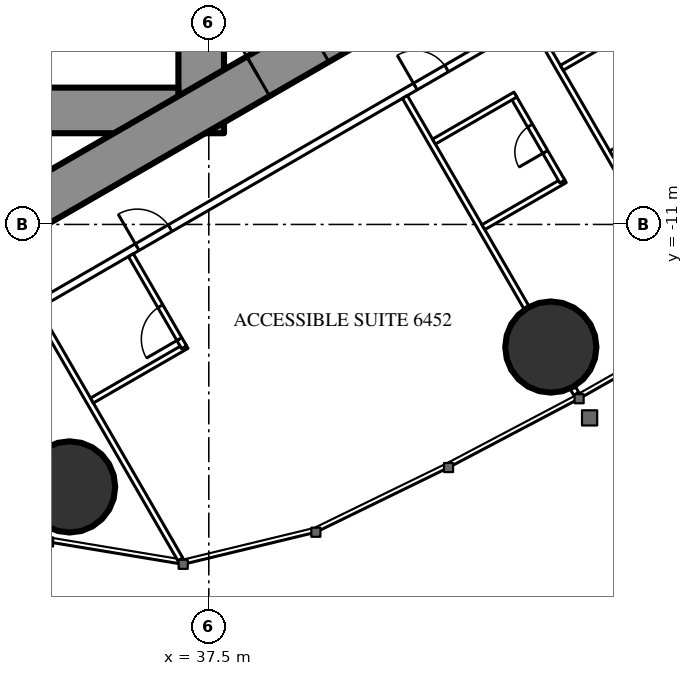
"""IFC4 building model, lengths in metres.
Left out: names, types, materials, properties, quantities, classifications, styles, units other than length and angle.
Written with IfcOpenShell. Run it as: python <this file> out.ifc"""

import sys

from ifc_helpers import new_model, si_unit, direction, frame, frame_2d, origin, origin_2d, place, context, subcontext, project, spatial, rectangle, circle, extrude, element, fill, save


model = new_model("IFC4")
c1 = context("Model", 3, precision=1e-05, world=origin(), true_north=direction((0.0, 1.0)))
c2 = subcontext(c1, "Body", "Model", "MODEL_VIEW")
j1 = project(units=[si_unit("LENGTHUNIT", "METRE"), si_unit("PLANEANGLEUNIT", "RADIAN")], contexts=[c1])
p1 = place(None, origin())
s1 = spatial("IfcSite", under=j1, at=p1, CompositionType="ELEMENT")
p2 = place(p1, origin())
s2 = spatial("IfcBuilding", under=s1, at=p2, CompositionType="ELEMENT")
p3 = place(p2, frame((0.0, 0.0, 240.5)))
s3 = spatial("IfcBuildingStorey", under=s2, at=p3, CompositionType="ELEMENT", Elevation=240.5)
for number, where, z_axis, x_axis in (
    (1, (33.837, -17.906, 0.0), (0.0, 0.0, 1.0), (1.0, 0.0, 0.0)),
    (2, (46.499, -14.226, 0.0), (0.0, 0.0, 1.0), (1.0, 0.0, 0.0)),
):
    element("IfcColumn", number, at=place(p3, frame(where, z_axis=z_axis, x_axis=x_axis)), inside=s3, PredefinedType="COLUMN", context=c2, shape_type="SweptSolid", body=[
        extrude(circle(Radius=1.2, at=origin_2d()), origin(), (0.0, 0.0, 1.0), 3.6),
    ])
p4 = place(p3, frame((37.3, -8.6, 0.0), z_axis=(0.0, 0.0, 1.0), x_axis=(0.0, 1.0, 0.0)))
e3 = element("IfcWall", 3, at=p4, inside=s3, PredefinedType="SHEAR", context=c2, shape_type="SweptSolid", body=[
    extrude(rectangle(XDim=17.2, YDim=1.2, at=frame_2d((8.6, 0.0))), origin(), (0.0, 0.0, 1.0), 3.6),
])
p5 = place(p4, frame((7.7, 0.0, 0.0)))
e4 = element("IfcOpeningElement", 4, at=p5, cuts=e3, PredefinedType="OPENING", context=c2, shape_type="SweptSolid", body=[
    extrude(rectangle(XDim=1.8, YDim=2.2, at=frame_2d((0.9, 1.1))), frame((0.0, 0.61, 0.0), z_axis=(0.0, -1.0, 0.0), x_axis=(1.0, 0.0, 0.0)), (0.0, 0.0, 1.0), 1.22),
])
p6 = place(p3, frame((28.3, -8.0, 0.0), z_axis=(0.0, 0.0, 1.0), x_axis=(1.0, 0.0, 0.0)))
e5 = element("IfcWall", 5, at=p6, inside=s3, PredefinedType="SHEAR", context=c2, shape_type="SweptSolid", body=[
    extrude(rectangle(XDim=8.4, YDim=1.2, at=frame_2d((4.2, 0.0))), origin(), (0.0, 0.0, 1.0), 3.6),
])
p7 = place(p6, frame((0.25, 0.0, 0.0)))
e6 = element("IfcOpeningElement", 6, at=p7, cuts=e5, PredefinedType="OPENING", context=c2, shape_type="SweptSolid", body=[
    extrude(rectangle(XDim=1.0, YDim=2.2, at=frame_2d((0.5, 1.1))), frame((0.0, 0.61, 0.0), z_axis=(0.0, -1.0, 0.0), x_axis=(1.0, 0.0, 0.0)), (0.0, 0.0, 1.0), 1.22),
])
p8 = place(p3, frame((27.2, -13.8, 0.0), z_axis=(0.0, 0.0, 1.0), x_axis=(0.866027159892, 0.499996958321, 0.0)))
e7 = element("IfcWall", 7, at=p8, inside=s3, PredefinedType="SHEAR", context=c2, shape_type="SweptSolid", body=[
    extrude(rectangle(XDim=27.947, YDim=1.2, at=frame_2d((13.973, 0.0))), origin(), (0.0, 0.0, 1.0), 3.6),
])
p9 = place(p8, frame((4.6, 0.0, 0.0)))
e8 = element("IfcOpeningElement", 8, at=p9, cuts=e7, PredefinedType="OPENING", context=c2, shape_type="SweptSolid", body=[
    extrude(rectangle(XDim=1.0, YDim=2.2, at=frame_2d((0.5, 1.1))), frame((0.0, 0.61, 0.0), z_axis=(0.0, -1.0, 0.0), x_axis=(1.0, 0.0, 0.0)), (0.0, 0.0, 1.0), 1.22),
])
p10 = place(p8, frame((13.395, 0.0, 0.0)))
e9 = element("IfcOpeningElement", 9, at=p10, cuts=e7, PredefinedType="OPENING", context=c2, shape_type="SweptSolid", body=[
    extrude(rectangle(XDim=1.8, YDim=2.2, at=frame_2d((0.9, 1.1))), frame((0.0, 0.61, 0.0), z_axis=(0.0, -1.0, 0.0), x_axis=(1.0, 0.0, 0.0)), (0.0, 0.0, 1.0), 1.22),
])
p11 = place(p3, frame((28.959, -15.44, 0.0), z_axis=(0.0, 0.0, 1.0), x_axis=(0.866025227435, 0.500000305447, 0.0)))
e10 = element("IfcWall", 10, at=p11, inside=s3, PredefinedType="PARTITIONING", context=c2, shape_type="SweptSolid", body=[
    extrude(rectangle(XDim=30.88, YDim=0.2, at=frame_2d((15.44, 0.0))), origin(), (0.0, 0.0, 1.0), 3.35),
])
p12 = place(p11, frame((1.494, 0.0, 0.0)))
e11 = element("IfcOpeningElement", 11, at=p12, cuts=e10, PredefinedType="OPENING", context=c2, shape_type="SweptSolid", body=[
    extrude(rectangle(XDim=1.8, YDim=2.03, at=frame_2d((0.9, 1.015))), frame((0.0, 0.11, 0.0), z_axis=(0.0, -1.0, 0.0), x_axis=(1.0, 0.0, 0.0)), (0.0, 0.0, 1.0), 0.22),
])
p13 = place(p11, frame((7.687, 0.0, 0.0)))
e12 = element("IfcOpeningElement", 12, at=p13, cuts=e10, PredefinedType="OPENING", context=c2, shape_type="SweptSolid", body=[
    extrude(rectangle(XDim=1.0, YDim=2.2, at=frame_2d((0.5, 1.1))), frame((0.0, 0.11, 0.0), z_axis=(0.0, -1.0, 0.0), x_axis=(1.0, 0.0, 0.0)), (0.0, 0.0, 1.0), 0.22),
])
p14 = place(p11, frame((16.137, 0.0, 0.0)))
e13 = element("IfcOpeningElement", 13, at=p14, cuts=e10, PredefinedType="OPENING", context=c2, shape_type="SweptSolid", body=[
    extrude(rectangle(XDim=0.95, YDim=2.2, at=frame_2d((0.475, 1.1))), frame((0.0, 0.11, 0.0), z_axis=(0.0, -1.0, 0.0), x_axis=(1.0, 0.0, 0.0)), (0.0, 0.0, 1.0), 0.22),
])
p15 = place(p11, frame((20.021, 0.0, 0.0)))
e14 = element("IfcOpeningElement", 14, at=p15, cuts=e10, PredefinedType="OPENING", context=c2, shape_type="SweptSolid", body=[
    extrude(rectangle(XDim=0.95, YDim=2.2, at=frame_2d((0.475, 1.1))), frame((0.0, 0.11, 0.0), z_axis=(0.0, -1.0, 0.0), x_axis=(1.0, 0.0, 0.0)), (0.0, 0.0, 1.0), 0.22),
])
p16 = place(p11, frame((26.253, 0.0, 0.0)))
e15 = element("IfcOpeningElement", 15, at=p16, cuts=e10, PredefinedType="OPENING", context=c2, shape_type="SweptSolid", body=[
    extrude(rectangle(XDim=0.95, YDim=2.2, at=frame_2d((0.475, 1.1))), frame((0.0, 0.11, 0.0), z_axis=(0.0, -1.0, 0.0), x_axis=(1.0, 0.0, 0.0)), (0.0, 0.0, 1.0), 0.22),
])
p17 = place(p3, frame((32.96, -13.246, 0.0), z_axis=(0.0, 0.0, 1.0), x_axis=(0.500000236886, -0.866025267018, 0.0)))
e16 = element("IfcWall", 16, at=p17, inside=s3, PredefinedType="PARTITIONING", context=c2, shape_type="SweptSolid", body=[
    extrude(rectangle(XDim=7.583, YDim=0.15, at=frame_2d((3.791, 0.0))), origin(), (0.0, 0.0, 1.0), 3.35),
])
p18 = place(p3, frame((42.66, -7.646, 0.0), z_axis=(0.0, 0.0, 1.0), x_axis=(0.499996592859, -0.866027370889, 0.0)))
e17 = element("IfcWall", 17, at=p18, inside=s3, PredefinedType="PARTITIONING", context=c2, shape_type="SweptSolid", body=[
    extrude(rectangle(XDim=6.398, YDim=0.15, at=frame_2d((3.199, 0.0))), origin(), (0.0, 0.0, 1.0), 2.45),
])
p19 = place(p3, frame((47.079, -15.3, 0.0), z_axis=(0.0, 0.0, 1.0), x_axis=(0.499212083968, -0.866479829667, 0.0)))
e18 = element("IfcWall", 18, at=p19, inside=s3, PredefinedType="PARTITIONING", context=c2, shape_type="SweptSolid", body=[
    extrude(rectangle(XDim=0.179, YDim=0.15, at=frame_2d((0.09, 0.0))), origin(), (0.0, 0.0, 1.0), 2.45),
])
p20 = place(p3, frame((46.023, -5.704, 0.0), z_axis=(0.0, 0.0, 1.0), x_axis=(0.499984478165, -0.866034365135, 0.0)))
e19 = element("IfcWall", 19, at=p20, inside=s3, PredefinedType="PARTITIONING", context=c2, shape_type="SweptSolid", body=[
    extrude(rectangle(XDim=6.426, YDim=0.15, at=frame_2d((3.213, 0.0))), origin(), (0.0, 0.0, 1.0), 2.45),
])
p21 = place(p3, frame((34.425, -15.633, 0.0), z_axis=(0.0, 0.0, 1.0), x_axis=(0.866018712932, 0.500011588718, 0.0)))
e20 = element("IfcWall", 20, at=p21, inside=s3, PredefinedType="PARTITIONING", context=c2, shape_type="SweptSolid", body=[
    extrude(rectangle(XDim=2.875, YDim=0.15, at=frame_2d((1.438, 0.0))), origin(), (0.0, 0.0, 1.0), 3.35),
])
p22 = place(p3, frame((35.45, -11.808, 0.0), z_axis=(0.0, 0.0, 1.0), x_axis=(0.49994636267, -0.866056369097, 0.0)))
e21 = element("IfcWall", 21, at=p22, inside=s3, PredefinedType="PARTITIONING", context=c2, shape_type="SweptSolid", body=[
    extrude(rectangle(XDim=2.8, YDim=0.15, at=frame_2d((1.4, 0.0))), origin(), (0.0, 0.0, 1.0), 3.35),
])
p23 = place(p22, frame((1.55, 0.0, 0.0)))
e22 = element("IfcOpeningElement", 22, at=p23, cuts=e21, PredefinedType="OPENING", context=c2, shape_type="SweptSolid", body=[
    extrude(rectangle(XDim=1.0, YDim=2.2, at=frame_2d((0.5, 1.1))), frame((0.0, 0.085, 0.0), z_axis=(0.0, -1.0, 0.0), x_axis=(1.0, 0.0, 0.0)), (0.0, 0.0, 1.0), 0.17),
])
p24 = place(p3, frame((44.725, -11.072, 0.0), z_axis=(0.0, 0.0, 1.0), x_axis=(0.866006523861, 0.500032699561, 0.0)))
e23 = element("IfcWall", 23, at=p24, inside=s3, PredefinedType="PARTITIONING", context=c2, shape_type="SweptSolid", body=[
    extrude(rectangle(XDim=2.475, YDim=0.15, at=frame_2d((1.237, 0.0))), origin(), (0.0, 0.0, 1.0), 3.35),
])
p25 = place(p3, frame((45.503, -7.621, 0.0), z_axis=(0.0, 0.0, 1.0), x_axis=(0.500006934395, -0.866021400173, 0.0)))
e24 = element("IfcWall", 24, at=p25, inside=s3, PredefinedType="PARTITIONING", context=c2, shape_type="SweptSolid", body=[
    extrude(rectangle(XDim=2.6, YDim=0.15, at=frame_2d((1.3, 0.0))), origin(), (0.0, 0.0, 1.0), 3.35),
])
p26 = place(p25, frame((0.9, 0.0, 0.0)))
e25 = element("IfcOpeningElement", 25, at=p26, cuts=e24, PredefinedType="OPENING", context=c2, shape_type="SweptSolid", body=[
    extrude(rectangle(XDim=0.8, YDim=2.2, at=frame_2d((0.4, 1.1))), frame((0.0, 0.085, 0.0), z_axis=(0.0, -1.0, 0.0), x_axis=(1.0, 0.0, 0.0)), (0.0, 0.0, 1.0), 0.17),
])
for number, where, z_axis, x_axis in (
    (26, (43.425, -8.821, 0.0), (0.0, 0.0, 1.0), (0.866, 0.5, 0.0)),
    (27, (48.088, -9.13, 0.0), (0.0, 0.0, 1.0), (0.866, 0.5, 0.0)),
    (28, (46.788, -6.879, 0.0), (0.0, 0.0, 1.0), (0.866, 0.5, 0.0)),
):
    element("IfcWall", number, at=place(p3, frame(where, z_axis=z_axis, x_axis=x_axis)), inside=s3, PredefinedType="PARTITIONING", context=c2, shape_type="SweptSolid", body=[
        extrude(rectangle(XDim=2.475, YDim=0.15, at=frame_2d((1.237, 0.0))), origin(), (0.0, 0.0, 1.0), 3.35),
    ])
p27 = place(p23, origin())
e29 = element("IfcDoor", 29, at=p27, inside=s3, OperationType="SINGLE_SWING_RIGHT", PredefinedType="DOOR", context=c2, shape_type="SweptSolid", body=[
    extrude(rectangle(XDim=1.0, YDim=2.2, at=frame_2d((0.5, 1.1))), frame((0.0, 0.025, 0.0), z_axis=(0.0, -1.0, 0.0), x_axis=(1.0, 0.0, 0.0)), (0.0, 0.0, 1.0), 0.05),
])
fill(e22, e29)
p28 = place(p13, origin())
e30 = element("IfcDoor", 30, at=p28, inside=s3, OperationType="SINGLE_SWING_LEFT", PredefinedType="DOOR", context=c2, shape_type="SweptSolid", body=[
    extrude(rectangle(XDim=1.0, YDim=2.2, at=frame_2d((0.5, 1.1))), frame((0.0, 0.025, 0.0), z_axis=(0.0, -1.0, 0.0), x_axis=(1.0, 0.0, 0.0)), (0.0, 0.0, 1.0), 0.05),
])
fill(e12, e30)
p29 = place(p26, origin())
e31 = element("IfcDoor", 31, at=p29, inside=s3, OperationType="SINGLE_SWING_RIGHT", PredefinedType="DOOR", context=c2, shape_type="SweptSolid", body=[
    extrude(rectangle(XDim=0.8, YDim=2.2, at=frame_2d((0.4, 1.1))), frame((0.0, 0.025, 0.0), z_axis=(0.0, -1.0, 0.0), x_axis=(1.0, 0.0, 0.0)), (0.0, 0.0, 1.0), 0.05),
])
fill(e25, e31)
p30 = place(p14, origin())
e32 = element("IfcDoor", 32, at=p30, inside=s3, OperationType="SINGLE_SWING_LEFT", PredefinedType="DOOR", context=c2, shape_type="SweptSolid", body=[
    extrude(rectangle(XDim=0.95, YDim=2.2, at=frame_2d((0.475, 1.1))), frame((0.0, 0.025, 0.0), z_axis=(0.0, -1.0, 0.0), x_axis=(1.0, 0.0, 0.0)), (0.0, 0.0, 1.0), 0.05),
])
fill(e13, e32)
p31 = place(p10, origin())
e33 = element("IfcDoor", 33, at=p31, inside=s3, OperationType="DOUBLE_DOOR_SINGLE_SWING", PredefinedType="DOOR", context=c2, shape_type="SweptSolid", body=[
    extrude(rectangle(XDim=1.8, YDim=2.2, at=frame_2d((0.9, 1.1))), frame((0.0, 0.025, 0.0), z_axis=(0.0, -1.0, 0.0), x_axis=(1.0, 0.0, 0.0)), (0.0, 0.0, 1.0), 0.05),
])
fill(e9, e33)
save(model, sys.argv[1])
